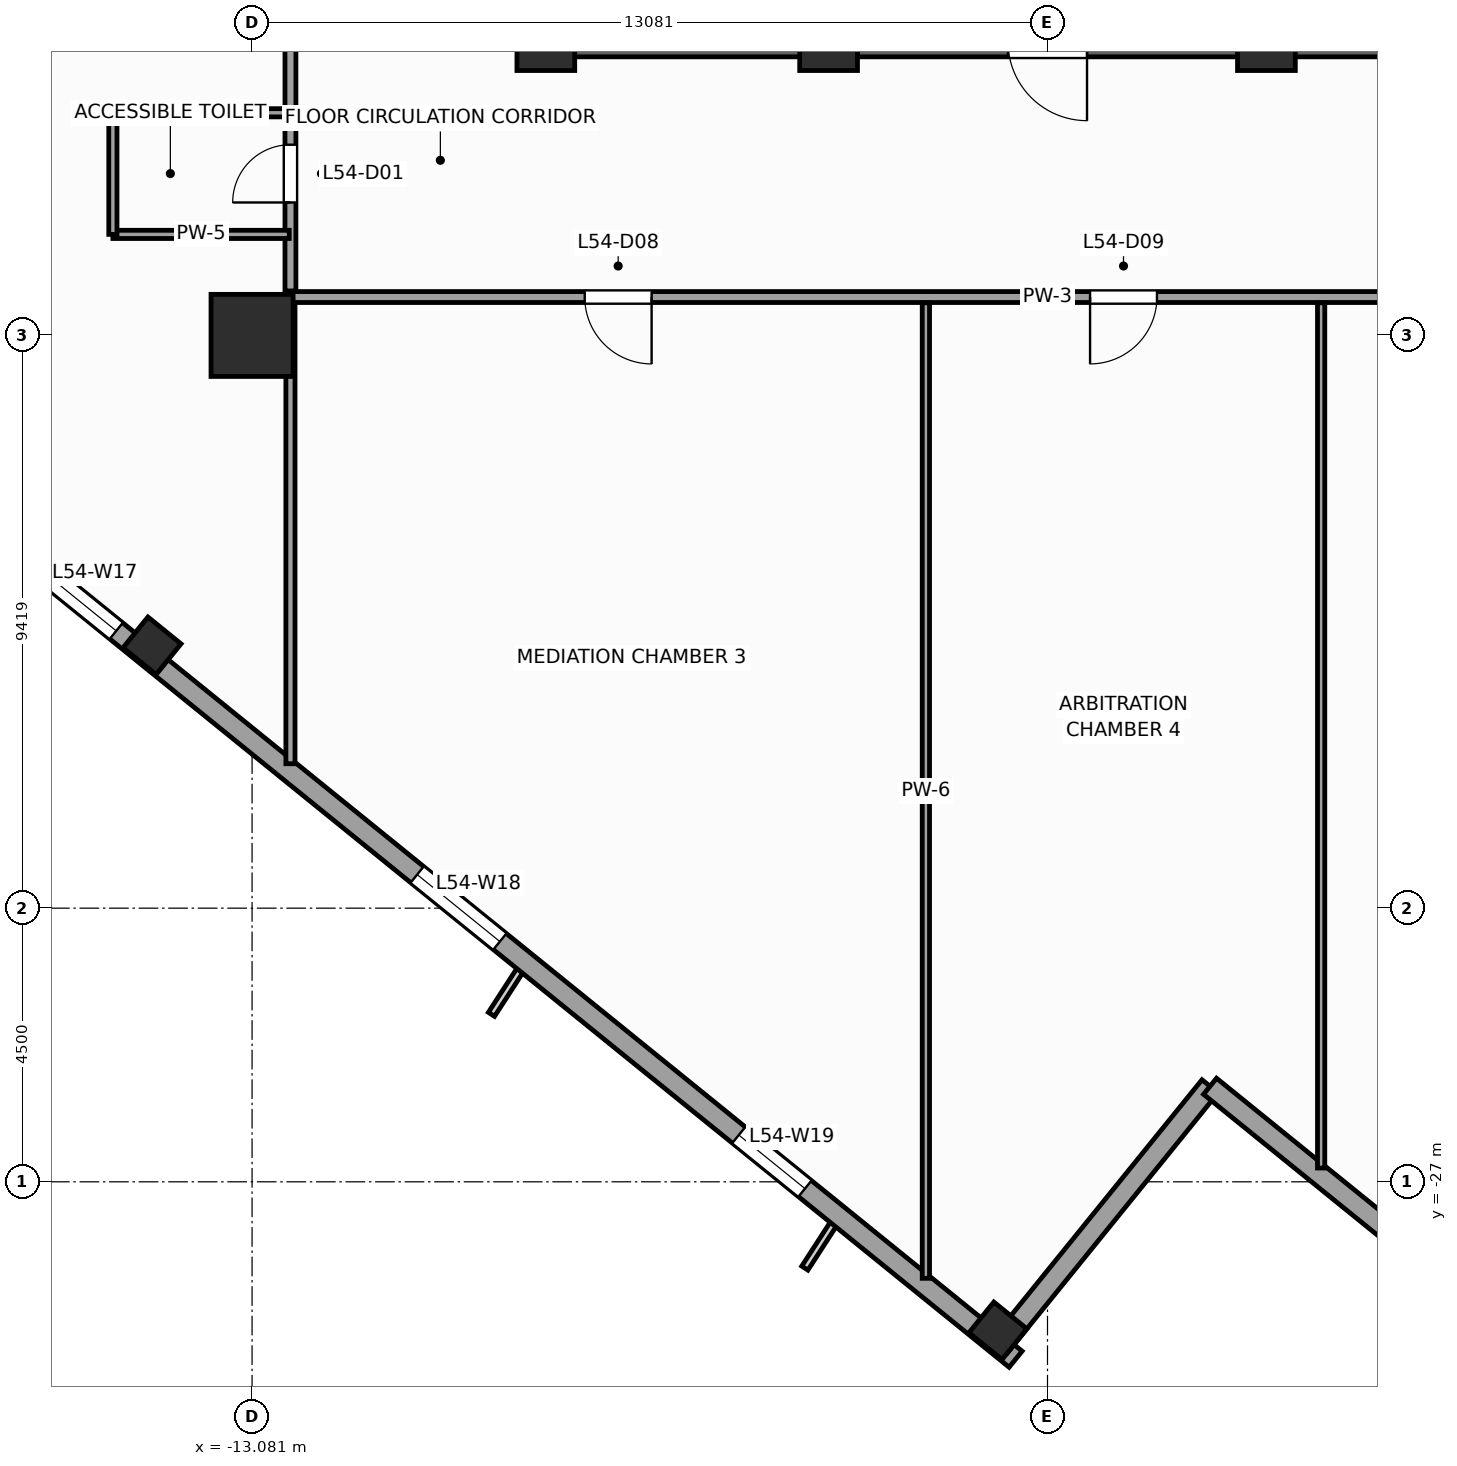
"""IFC4 building model, lengths in metres.
Left out: names, types, materials, properties, quantities, classifications, styles, units other than length and angle.
Written with IfcOpenShell. Run it as: python <this file> out.ifc"""

import sys

from ifc_helpers import new_model, si_unit, direction, frame, frame_2d, origin, origin_2d, place, context, subcontext, project, spatial, rectangle, extrude, source, transform, mapped, element, fill, save


model = new_model("IFC4")
c1 = context("Model", 3, precision=1e-05, world=origin(), true_north=direction((0.0, 1.0)))
c2 = subcontext(c1, "Body", "Model", "MODEL_VIEW")
j1 = project(units=[si_unit("LENGTHUNIT", "METRE"), si_unit("PLANEANGLEUNIT", "RADIAN")], contexts=[c1])
p1 = place(None, origin())
s1 = spatial("IfcSite", under=j1, at=p1, CompositionType="ELEMENT")
p2 = place(p1, origin())
s2 = spatial("IfcBuilding", under=s1, at=p2, CompositionType="ELEMENT")
p3 = place(p2, frame((0.0, 0.0, 225.1)))
s3 = spatial("IfcBuildingStorey", under=s2, at=p3, CompositionType="ELEMENT", Elevation=225.1)
p4 = place(p3, frame((-8.5, -8.25, 0.0), z_axis=(0.0, 0.0, 1.0), x_axis=(1.0, 0.0, 0.0)))
e1 = element("IfcWall", 1, at=p4, inside=s3, PredefinedType="SHEAR", context=c2, shape_type="SweptSolid", body=[
    extrude(rectangle(XDim=17.0, YDim=0.5, at=frame_2d((8.5, 0.0))), origin(), (0.0, 0.0, 1.0), 3.9),
])
p5 = place(p4, frame((7.85, 0.0, 0.0)))
e2 = element("IfcOpeningElement", 2, at=p5, cuts=e1, PredefinedType="OPENING", context=c2, shape_type="SweptSolid", body=[
    extrude(rectangle(XDim=1.3, YDim=2.2, at=frame_2d((0.65, 1.1))), frame((0.0, 0.26, 0.0), z_axis=(0.0, -1.0, 0.0), x_axis=(1.0, 0.0, 0.0)), (0.0, 0.0, 1.0), 0.52),
])
m1 = source(origin(), c2, "Body", "SweptSolid", [
    extrude(rectangle(XDim=0.95, YDim=0.95, at=origin_2d()), origin(), (0.0, 0.0, 1.0), 3.9),
])
for number, where, z_axis, x_axis in (
    (3, (-8.25, -8.25, 0.0), (0.0, 0.0, 1.0), (1.0, 0.0, 0.0)),
    (4, (-3.6, -8.25, 0.0), (0.0, 0.0, 1.0), (1.0, 0.0, 0.0)),
    (5, (3.6, -8.25, 0.0), (0.0, 0.0, 1.0), (1.0, 0.0, 0.0)),
):
    element("IfcColumn", number, at=place(p3, frame(where, z_axis=z_axis, x_axis=x_axis)), inside=s3, PredefinedType="PILASTER", context=c2, shape_type="MappedRepresentation", body=[
        mapped(m1, transform((0.0, 0.0, 0.0), scale=1.0)),
    ])
m2 = source(origin(), c2, "Body", "SweptSolid", [
    extrude(rectangle(XDim=1.35, YDim=1.35, at=origin_2d()), origin(), (0.0, 0.0, 1.0), 3.9),
])
p6 = place(p3, frame((-13.081, -13.081, 0.0), z_axis=(0.0, 0.0, 1.0), x_axis=(1.0, 0.0, 0.0)))
e6 = element("IfcColumn", 6, at=p6, inside=s3, PredefinedType="COLUMN", context=c2, shape_type="MappedRepresentation", body=[
    mapped(m2, transform((0.0, 0.0, 0.0), scale=1.0)),
])
m3 = source(origin(), c2, "Body", "SweptSolid", [
    extrude(rectangle(XDim=0.65, YDim=0.7, at=origin_2d()), origin(), (0.0, 0.0, 1.0), 3.9),
])
for number, where, z_axis, x_axis in (
    (7, (-14.726, -18.185, 0.0), (0.0, 0.0, 1.0), (0.629, 0.777, 0.0)),
    (8, (-0.815, -29.45, 0.0), (0.0, 0.0, 1.0), (0.629, 0.777, 0.0)),
):
    element("IfcColumn", number, at=place(p3, frame(where, z_axis=z_axis, x_axis=x_axis)), inside=s3, PredefinedType="COLUMN", context=c2, shape_type="MappedRepresentation", body=[
        mapped(m3, transform((0.0, 0.0, 0.0), scale=1.0)),
    ])
p7 = place(p3, frame((-29.154, -6.733, 0.0), z_axis=(0.0, 0.0, 1.0), x_axis=(0.77714192302, -0.629325378072, 0.0)))
e9 = element("IfcWall", 9, at=p7, inside=s3, PredefinedType="STANDARD", context=c2, shape_type="SweptSolid", body=[
    extrude(rectangle(XDim=36.84, YDim=0.34, at=frame_2d((18.42, 0.0))), origin(), (0.0, 0.0, 1.0), 2.96),
])
p8 = place(p7, frame((3.721, 0.0, 0.48)))
e10 = element("IfcOpeningElement", 10, at=p8, cuts=e9, PredefinedType="OPENING", context=c2, shape_type="SweptSolid", body=[
    extrude(rectangle(XDim=1.4, YDim=2.4, at=frame_2d((0.7, 1.2))), frame((0.0, 0.18, 0.0), z_axis=(0.0, -1.0, 0.0), x_axis=(1.0, 0.0, 0.0)), (0.0, 0.0, 1.0), 0.36),
])
p9 = place(p7, frame((9.809, 0.0, 0.58)))
e11 = element("IfcOpeningElement", 11, at=p9, cuts=e9, PredefinedType="OPENING", context=c2, shape_type="SweptSolid", body=[
    extrude(rectangle(XDim=1.75, YDim=2.3, at=frame_2d((0.875, 1.15))), frame((0.0, 0.18, 0.0), z_axis=(0.0, -1.0, 0.0), x_axis=(1.0, 0.0, 0.0)), (0.0, 0.0, 1.0), 0.36),
])
p10 = place(p7, frame((16.058, 0.0, 0.58)))
e12 = element("IfcOpeningElement", 12, at=p10, cuts=e9, PredefinedType="OPENING", context=c2, shape_type="SweptSolid", body=[
    extrude(rectangle(XDim=1.75, YDim=2.3, at=frame_2d((0.875, 1.15))), frame((0.0, 0.18, 0.0), z_axis=(0.0, -1.0, 0.0), x_axis=(1.0, 0.0, 0.0)), (0.0, 0.0, 1.0), 0.36),
])
p11 = place(p7, frame((24.176, 0.0, 0.58)))
e13 = element("IfcOpeningElement", 13, at=p11, cuts=e9, PredefinedType="OPENING", context=c2, shape_type="SweptSolid", body=[
    extrude(rectangle(XDim=1.75, YDim=2.3, at=frame_2d((0.875, 1.15))), frame((0.0, 0.18, 0.0), z_axis=(0.0, -1.0, 0.0), x_axis=(1.0, 0.0, 0.0)), (0.0, 0.0, 1.0), 0.36),
])
p12 = place(p7, frame((30.982, 0.0, 0.48)))
e14 = element("IfcOpeningElement", 14, at=p12, cuts=e9, PredefinedType="OPENING", context=c2, shape_type="SweptSolid", body=[
    extrude(rectangle(XDim=1.4, YDim=2.4, at=frame_2d((0.7, 1.2))), frame((0.0, 0.18, 0.0), z_axis=(0.0, -1.0, 0.0), x_axis=(1.0, 0.0, 0.0)), (0.0, 0.0, 1.0), 0.36),
])
p13 = place(p3, frame((-0.789, -29.703, 0.0), z_axis=(0.0, 0.0, 1.0), x_axis=(0.629323365087, 0.77714355312, 0.0)))
e15 = element("IfcWall", 15, at=p13, inside=s3, PredefinedType="STANDARD", context=c2, shape_type="SweptSolid", body=[
    extrude(rectangle(XDim=5.5, YDim=0.34, at=frame_2d((2.75, 0.0))), origin(), (0.0, 0.0, 1.0), 3.66),
])
p14 = place(p3, frame((2.673, -25.429, 0.0), z_axis=(0.0, 0.0, 1.0), x_axis=(0.777162640055, -0.629299794138, 0.0)))
e16 = element("IfcWall", 16, at=p14, inside=s3, PredefinedType="STANDARD", context=c2, shape_type="SweptSolid", body=[
    extrude(rectangle(XDim=5.67, YDim=0.34, at=frame_2d((2.835, 0.0))), origin(), (0.0, 0.0, 1.0), 3.66),
])
p15 = place(p3, frame((-12.45, -12.45, 0.0), z_axis=(0.0, 0.0, 1.0), x_axis=(1.0, 0.0, 0.0)))
e17 = element("IfcWall", 17, at=p15, inside=s3, PredefinedType="PARTITIONING", context=c2, shape_type="SweptSolid", body=[
    extrude(rectangle(XDim=24.9, YDim=0.18, at=frame_2d((12.45, 0.0))), origin(), (0.0, 0.0, 1.0), 3.66),
])
p16 = place(p15, frame((4.839, 0.0, 0.0)))
e18 = element("IfcOpeningElement", 18, at=p16, cuts=e17, PredefinedType="OPENING", context=c2, shape_type="SweptSolid", body=[
    extrude(rectangle(XDim=1.1, YDim=2.2, at=frame_2d((0.55, 1.1))), frame((0.0, 0.1, 0.0), z_axis=(0.0, -1.0, 0.0), x_axis=(1.0, 0.0, 0.0)), (0.0, 0.0, 1.0), 0.2),
])
p17 = place(p15, frame((13.15, 0.0, 0.0)))
e19 = element("IfcOpeningElement", 19, at=p17, cuts=e17, PredefinedType="OPENING", context=c2, shape_type="SweptSolid", body=[
    extrude(rectangle(XDim=1.1, YDim=2.2, at=frame_2d((0.55, 1.1))), frame((0.0, 0.1, 0.0), z_axis=(0.0, -1.0, 0.0), x_axis=(1.0, 0.0, 0.0)), (0.0, 0.0, 1.0), 0.2),
])
p18 = place(p15, frame((20.21, 0.0, 0.0)))
e20 = element("IfcOpeningElement", 20, at=p18, cuts=e17, PredefinedType="OPENING", context=c2, shape_type="SweptSolid", body=[
    extrude(rectangle(XDim=1.1, YDim=2.2, at=frame_2d((0.55, 1.1))), frame((0.0, 0.1, 0.0), z_axis=(0.0, -1.0, 0.0), x_axis=(1.0, 0.0, 0.0)), (0.0, 0.0, 1.0), 0.2),
])
p19 = place(p3, frame((-12.45, -12.35, 0.0), z_axis=(0.0, 0.0, 1.0), x_axis=(0.0, 1.0, 0.0)))
e21 = element("IfcWall", 21, at=p19, inside=s3, PredefinedType="PARTITIONING", context=c2, shape_type="SweptSolid", body=[
    extrude(rectangle(XDim=16.15, YDim=0.18, at=frame_2d((8.075, 0.0))), origin(), (0.0, 0.0, 1.0), 3.66),
])
p20 = place(p19, frame((1.455, 0.0, 0.0)))
e22 = element("IfcOpeningElement", 22, at=p20, cuts=e21, PredefinedType="OPENING", context=c2, shape_type="SweptSolid", body=[
    extrude(rectangle(XDim=0.95, YDim=2.1, at=frame_2d((0.475, 1.05))), frame((0.0, 0.1, 0.0), z_axis=(0.0, -1.0, 0.0), x_axis=(1.0, 0.0, 0.0)), (0.0, 0.0, 1.0), 0.2),
])
p21 = place(p19, frame((14.111, 0.0, 0.0)))
e23 = element("IfcOpeningElement", 23, at=p21, cuts=e21, PredefinedType="OPENING", context=c2, shape_type="SweptSolid", body=[
    extrude(rectangle(XDim=1.1, YDim=2.2, at=frame_2d((0.55, 1.1))), frame((0.0, 0.1, 0.0), z_axis=(0.0, -1.0, 0.0), x_axis=(1.0, 0.0, 0.0)), (0.0, 0.0, 1.0), 0.2),
])
p22 = place(p19, frame((7.659, 0.0, 0.0)))
e24 = element("IfcOpeningElement", 24, at=p22, cuts=e21, PredefinedType="OPENING", context=c2, shape_type="SweptSolid", body=[
    extrude(rectangle(XDim=1.1, YDim=2.2, at=frame_2d((0.55, 1.1))), frame((0.0, 0.1, 0.0), z_axis=(0.0, -1.0, 0.0), x_axis=(1.0, 0.0, 0.0)), (0.0, 0.0, 1.0), 0.2),
])
p23 = place(p3, frame((-12.45, -20.125, 0.0), z_axis=(0.0, 0.0, 1.0), x_axis=(0.0, 1.0, 0.0)))
e25 = element("IfcWall", 25, at=p23, inside=s3, PredefinedType="PARTITIONING", context=c2, shape_type="SweptSolid", body=[
    extrude(rectangle(XDim=7.58, YDim=0.15, at=frame_2d((3.79, 0.0))), origin(), (0.0, 0.0, 1.0), 3.66),
])
p24 = place(p3, frame((-2.0, -28.587, 0.0), z_axis=(0.0, 0.0, 1.0), x_axis=(0.0, 1.0, 0.0)))
e26 = element("IfcWall", 26, at=p24, inside=s3, PredefinedType="PARTITIONING", context=c2, shape_type="SweptSolid", body=[
    extrude(rectangle(XDim=16.042, YDim=0.12, at=frame_2d((8.021, 0.0))), origin(), (0.0, 0.0, 1.0), 3.66),
])
p25 = place(p3, frame((4.5, -26.773, 0.0), z_axis=(0.0, 0.0, 1.0), x_axis=(0.0, 1.0, 0.0)))
e27 = element("IfcWall", 27, at=p25, inside=s3, PredefinedType="PARTITIONING", context=c2, shape_type="SweptSolid", body=[
    extrude(rectangle(XDim=14.229, YDim=0.12, at=frame_2d((7.114, 0.0))), origin(), (0.0, 0.0, 1.0), 3.66),
])
for number, where, z_axis, x_axis in (
    (28, (-15.37, -11.42, 0.0), (0.0, 0.0, 1.0), (1.0, 0.0, 0.0)),
    (29, (-15.37, -9.42, 0.0), (0.0, 0.0, 1.0), (1.0, 0.0, 0.0)),
):
    element("IfcWall", number, at=place(p3, frame(where, z_axis=z_axis, x_axis=x_axis)), inside=s3, PredefinedType="PARTITIONING", context=c2, shape_type="SweptSolid", body=[
        extrude(rectangle(XDim=2.9, YDim=0.135, at=frame_2d((1.45, 0.0))), origin(), (0.0, 0.0, 1.0), 3.66),
    ])
p26 = place(p3, frame((-15.37, -11.42, 0.0), z_axis=(0.0, 0.0, 1.0), x_axis=(0.0, 1.0, 0.0)))
e30 = element("IfcWall", 30, at=p26, inside=s3, PredefinedType="PARTITIONING", context=c2, shape_type="SweptSolid", body=[
    extrude(rectangle(XDim=2.0, YDim=0.135, at=frame_2d((1.0, 0.0))), origin(), (0.0, 0.0, 1.0), 3.66),
])
m4 = source(origin(), c2, "Body", "SweptSolid", [
    extrude(rectangle(XDim=1.75, YDim=2.3, at=frame_2d((0.875, 1.15))), frame((0.0, 0.03, 0.0), z_axis=(0.0, -1.0, 0.0), x_axis=(1.0, 0.0, 0.0)), (0.0, 0.0, 1.0), 0.06),
])
p27 = place(p10, origin())
e31 = element("IfcWindow", 31, at=p27, inside=s3, PartitioningType="SINGLE_PANEL", PredefinedType="WINDOW", context=c2, shape_type="MappedRepresentation", body=[
    mapped(m4, transform((0.0, 0.0, 0.0), scale=1.0)),
])
fill(e12, e31)
p28 = place(p11, origin())
e32 = element("IfcWindow", 32, at=p28, inside=s3, PartitioningType="SINGLE_PANEL", PredefinedType="WINDOW", context=c2, shape_type="MappedRepresentation", body=[
    mapped(m4, transform((0.0, 0.0, 0.0), scale=1.0)),
])
fill(e13, e32)
m5 = source(origin(), c2, "Body", "SweptSolid", [
    extrude(rectangle(XDim=1.4, YDim=2.4, at=frame_2d((0.7, 1.2))), frame((0.0, 0.03, 0.0), z_axis=(0.0, -1.0, 0.0), x_axis=(1.0, 0.0, 0.0)), (0.0, 0.0, 1.0), 0.06),
])
p29 = place(p12, origin())
e33 = element("IfcWindow", 33, at=p29, inside=s3, PartitioningType="SINGLE_PANEL", PredefinedType="WINDOW", context=c2, shape_type="MappedRepresentation", body=[
    mapped(m5, transform((0.0, 0.0, 0.0), scale=1.0)),
])
fill(e14, e33)
m6 = source(origin(), c2, "Body", "SweptSolid", [
    extrude(rectangle(XDim=0.95, YDim=2.1, at=frame_2d((0.475, 1.05))), frame((0.0, 0.025, 0.0), z_axis=(0.0, -1.0, 0.0), x_axis=(1.0, 0.0, 0.0)), (0.0, 0.0, 1.0), 0.05),
])
p30 = place(p20, origin())
e34 = element("IfcDoor", 34, at=p30, inside=s3, OperationType="SINGLE_SWING_LEFT", PredefinedType="DOOR", context=c2, shape_type="MappedRepresentation", body=[
    mapped(m6, transform((0.0, 0.0, 0.0), scale=1.0)),
])
fill(e22, e34)
m7 = source(origin(), c2, "Body", "SweptSolid", [
    extrude(rectangle(XDim=1.1, YDim=2.2, at=frame_2d((0.55, 1.1))), frame((0.0, 0.025, 0.0), z_axis=(0.0, -1.0, 0.0), x_axis=(1.0, 0.0, 0.0)), (0.0, 0.0, 1.0), 0.05),
])
p31 = place(p16, frame((1.1, 0.0, 0.0), z_axis=(0.0, 0.0, 1.0), x_axis=(-1.0, 0.0, 0.0)))
e35 = element("IfcDoor", 35, at=p31, inside=s3, OperationType="SINGLE_SWING_RIGHT", PredefinedType="DOOR", context=c2, shape_type="MappedRepresentation", body=[
    mapped(m7, transform((0.0, 0.0, 0.0), scale=1.0)),
])
fill(e18, e35)
p32 = place(p17, frame((1.1, 0.0, 0.0), z_axis=(0.0, 0.0, 1.0), x_axis=(-1.0, 0.0, 0.0)))
e36 = element("IfcDoor", 36, at=p32, inside=s3, OperationType="SINGLE_SWING_LEFT", PredefinedType="DOOR", context=c2, shape_type="MappedRepresentation", body=[
    mapped(m7, transform((0.0, 0.0, 0.0), scale=1.0)),
])
fill(e19, e36)
save(model, sys.argv[1])
